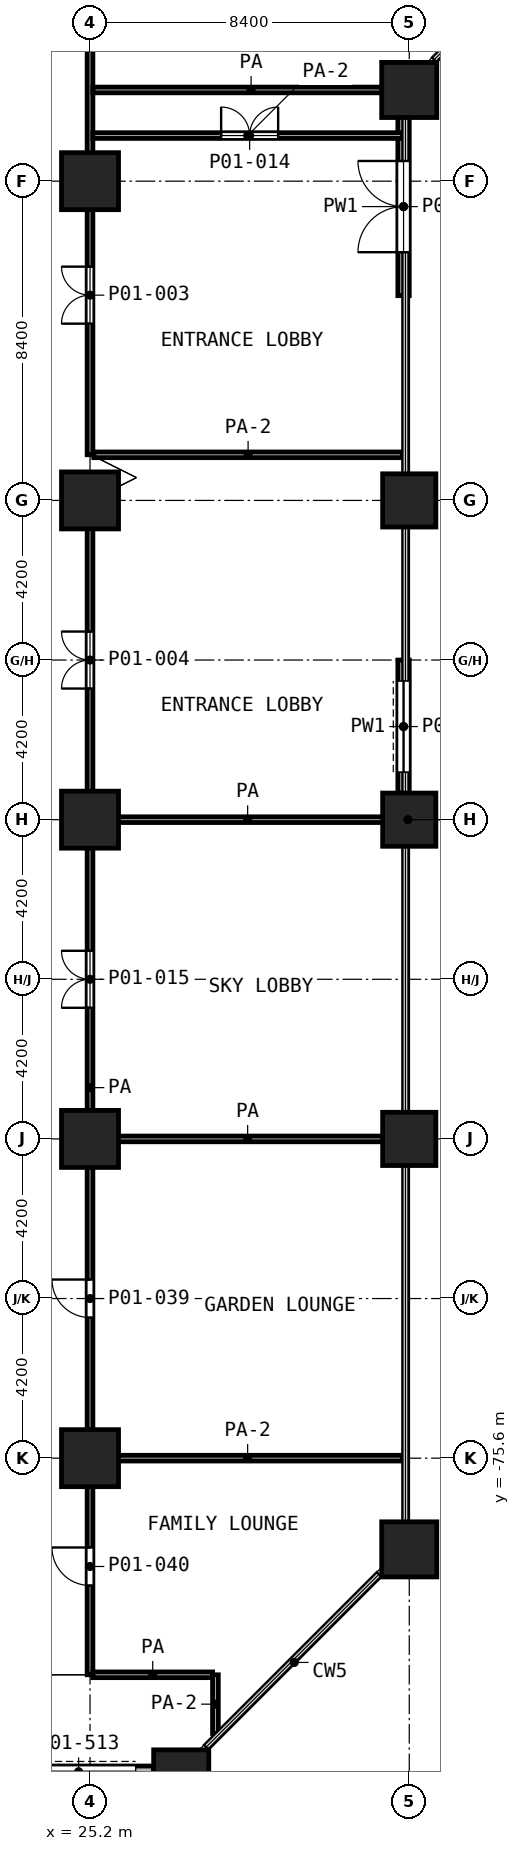
"""IFC4 building model, lengths in metres.
Left out: names, types, materials, properties, quantities, classifications, styles, units other than length and angle.
Written with IfcOpenShell. Run it as: python <this file> out.ifc"""

import sys

from ifc_helpers import new_model, si_unit, direction, frame, frame_2d, origin, origin_2d, place, context, subcontext, project, spatial, rectangle, extrude, element, fill, save


model = new_model("IFC4")
c1 = context("Model", 3, precision=1e-05, world=origin(), true_north=direction((0.0, 1.0)))
c2 = subcontext(c1, "Body", "Model", "MODEL_VIEW")
j1 = project(units=[si_unit("LENGTHUNIT", "METRE"), si_unit("PLANEANGLEUNIT", "RADIAN")], contexts=[c1])
p1 = place(None, origin())
s1 = spatial("IfcSite", under=j1, at=p1, CompositionType="ELEMENT")
p2 = place(p1, origin())
s2 = spatial("IfcBuilding", under=s1, at=p2, CompositionType="ELEMENT")
p3 = place(p2, origin())
s3 = spatial("IfcBuildingStorey", under=s2, at=p3, CompositionType="ELEMENT", Elevation=0.0)
p4 = place(p3, frame((33.6, -39.6, 0.0), z_axis=(0.0, 0.0, 1.0), x_axis=(1.0, 0.0, 0.0)))
e1 = element("IfcColumn", 1, at=p4, inside=s3, PredefinedType="COLUMN", context=c2, shape_type="SweptSolid", body=[
    extrude(rectangle(XDim=1.45, YDim=1.45, at=origin_2d()), origin(), (0.0, 0.0, 1.0), 7.0),
])
for number, where, z_axis, x_axis in (
    (2, (25.2, -42.0, 0.0), (0.0, 0.0, 1.0), (1.0, 0.0, 0.0)),
    (3, (25.2, -50.4, 0.0), (0.0, 0.0, 1.0), (1.0, 0.0, 0.0)),
):
    element("IfcColumn", number, at=place(p3, frame(where, z_axis=z_axis, x_axis=x_axis)), inside=s3, PredefinedType="COLUMN", context=c2, shape_type="SweptSolid", body=[
        extrude(rectangle(XDim=1.5, YDim=1.5, at=origin_2d()), origin(), (0.0, 0.0, 1.0), 7.0),
    ])
p5 = place(p3, frame((33.6, -50.4, 0.0), z_axis=(0.0, 0.0, 1.0), x_axis=(1.0, 0.0, 0.0)))
e4 = element("IfcColumn", 4, at=p5, inside=s3, PredefinedType="COLUMN", context=c2, shape_type="SweptSolid", body=[
    extrude(rectangle(XDim=1.4, YDim=1.4, at=origin_2d()), origin(), (0.0, 0.0, 1.0), 7.0),
])
p6 = place(p3, frame((25.2, -58.8, 0.0), z_axis=(0.0, 0.0, 1.0), x_axis=(1.0, 0.0, 0.0)))
e5 = element("IfcColumn", 5, at=p6, inside=s3, PredefinedType="COLUMN", context=c2, shape_type="SweptSolid", body=[
    extrude(rectangle(XDim=1.5, YDim=1.5, at=origin_2d()), origin(), (0.0, 0.0, 1.0), 7.0),
])
p7 = place(p3, frame((33.6, -58.8, 0.0), z_axis=(0.0, 0.0, 1.0), x_axis=(1.0, 0.0, 0.0)))
e6 = element("IfcColumn", 6, at=p7, inside=s3, PredefinedType="COLUMN", context=c2, shape_type="SweptSolid", body=[
    extrude(rectangle(XDim=1.4, YDim=1.4, at=origin_2d()), origin(), (0.0, 0.0, 1.0), 7.0),
])
p8 = place(p3, frame((25.2, -67.2, 0.0), z_axis=(0.0, 0.0, 1.0), x_axis=(1.0, 0.0, 0.0)))
e7 = element("IfcColumn", 7, at=p8, inside=s3, PredefinedType="COLUMN", context=c2, shape_type="SweptSolid", body=[
    extrude(rectangle(XDim=1.5, YDim=1.5, at=origin_2d()), origin(), (0.0, 0.0, 1.0), 7.0),
])
p9 = place(p3, frame((33.6, -67.2, 0.0), z_axis=(0.0, 0.0, 1.0), x_axis=(1.0, 0.0, 0.0)))
e8 = element("IfcColumn", 8, at=p9, inside=s3, PredefinedType="COLUMN", context=c2, shape_type="SweptSolid", body=[
    extrude(rectangle(XDim=1.4, YDim=1.4, at=origin_2d()), origin(), (0.0, 0.0, 1.0), 7.0),
])
p10 = place(p3, frame((25.2, -75.6, 0.0), z_axis=(0.0, 0.0, 1.0), x_axis=(1.0, 0.0, 0.0)))
e9 = element("IfcColumn", 9, at=p10, inside=s3, PredefinedType="COLUMN", context=c2, shape_type="SweptSolid", body=[
    extrude(rectangle(XDim=1.5, YDim=1.5, at=origin_2d()), origin(), (0.0, 0.0, 1.0), 7.0),
])
for number, where, z_axis, x_axis in (
    (10, (33.6, -78.0, 0.0), (0.0, 0.0, 1.0), (1.0, 0.0, 0.0)),
    (11, (27.6, -84.0, 0.0), (0.0, 0.0, 1.0), (1.0, 0.0, 0.0)),
):
    element("IfcColumn", number, at=place(p3, frame(where, z_axis=z_axis, x_axis=x_axis)), inside=s3, PredefinedType="COLUMN", context=c2, shape_type="SweptSolid", body=[
        extrude(rectangle(XDim=1.45, YDim=1.45, at=origin_2d()), origin(), (0.0, 0.0, 1.0), 7.0),
    ])
p11 = place(p3, frame((33.45, -58.1, 0.0), z_axis=(0.0, 0.0, 1.0), x_axis=(0.0, 1.0, 0.0)))
e12 = element("IfcWall", 12, at=p11, inside=s3, PredefinedType="SOLIDWALL", context=c2, shape_type="SweptSolid", body=[
    extrude(rectangle(XDim=3.5, YDim=0.3, at=frame_2d((1.75, 0.0))), origin(), (0.0, 0.0, 1.0), 5.25),
])
p12 = place(p11, frame((0.55, 0.0, 0.0)))
e13 = element("IfcOpeningElement", 13, at=p12, cuts=e12, PredefinedType="OPENING", context=c2, shape_type="SweptSolid", body=[
    extrude(rectangle(XDim=2.4, YDim=2.4, at=frame_2d((1.2, 1.2))), frame((0.0, 0.16, 0.0), z_axis=(0.0, -1.0, 0.0), x_axis=(1.0, 0.0, 0.0)), (0.0, 0.0, 1.0), 0.32),
])
p13 = place(p3, frame((33.45, -45.012, 0.0), z_axis=(0.0, 0.0, 1.0), x_axis=(0.0, 1.0, 0.0)))
e14 = element("IfcWall", 14, at=p13, inside=s3, PredefinedType="SOLIDWALL", context=c2, shape_type="SweptSolid", body=[
    extrude(rectangle(XDim=4.688, YDim=0.3, at=frame_2d((2.344, 0.0))), origin(), (0.0, 0.0, 1.0), 5.25),
])
p14 = place(p13, frame((1.144, 0.0, 0.0)))
e15 = element("IfcOpeningElement", 15, at=p14, cuts=e14, PredefinedType="OPENING", context=c2, shape_type="SweptSolid", body=[
    extrude(rectangle(XDim=2.4, YDim=2.4, at=frame_2d((1.2, 1.2))), frame((0.0, 0.16, 0.0), z_axis=(0.0, -1.0, 0.0), x_axis=(1.0, 0.0, 0.0)), (0.0, 0.0, 1.0), 0.32),
])
p15 = place(p3, frame((17.5, -83.85, 0.0), z_axis=(0.0, 0.0, 1.0), x_axis=(1.0, 0.0, 0.0)))
e16 = element("IfcWall", 16, at=p15, inside=s3, PredefinedType="SOLIDWALL", context=c2, shape_type="SweptSolid", body=[
    extrude(rectangle(XDim=9.375, YDim=0.3, at=frame_2d((4.688, 0.0))), origin(), (0.0, 0.0, 1.0), 5.25),
])
p16 = place(p15, frame((0.5, 0.0, 0.0)))
e17 = element("IfcOpeningElement", 17, at=p16, cuts=e16, PredefinedType="OPENING", context=c2, shape_type="SweptSolid", body=[
    extrude(rectangle(XDim=3.0, YDim=3.5, at=frame_2d((1.5, 1.75))), frame((0.0, 0.16, 0.0), z_axis=(0.0, -1.0, 0.0), x_axis=(1.0, 0.0, 0.0)), (0.0, 0.0, 1.0), 0.32),
])
p17 = place(p15, frame((5.9, 0.0, 0.0)))
e18 = element("IfcOpeningElement", 18, at=p17, cuts=e16, PredefinedType="OPENING", context=c2, shape_type="SweptSolid", body=[
    extrude(rectangle(XDim=3.0, YDim=3.5, at=frame_2d((1.5, 1.75))), frame((0.0, 0.16, 0.0), z_axis=(0.0, -1.0, 0.0), x_axis=(1.0, 0.0, 0.0)), (0.0, 0.0, 1.0), 0.32),
])
p18 = place(p3, frame((25.275, -81.3, 0.0), z_axis=(0.0, 0.0, 1.0), x_axis=(1.0, 0.0, 0.0)))
e19 = element("IfcWall", 19, at=p18, inside=s3, PredefinedType="PARTITIONING", context=c2, shape_type="SweptSolid", body=[
    extrude(rectangle(XDim=3.15, YDim=0.15, at=frame_2d((1.575, 0.0))), origin(), (0.0, 0.0, 1.0), 6.65),
])
p19 = place(p3, frame((25.275, -75.6, 0.0), z_axis=(0.0, 0.0, 1.0), x_axis=(1.0, 0.0, 0.0)))
e20 = element("IfcWall", 20, at=p19, inside=s3, PredefinedType="PARTITIONING", context=c2, shape_type="SweptSolid", body=[
    extrude(rectangle(XDim=8.145, YDim=0.15, at=frame_2d((4.073, 0.0))), origin(), (0.0, 0.0, 1.0), 5.25),
])
for number, where, z_axis, x_axis in (
    (21, (25.275, -67.2, 0.0), (0.0, 0.0, 1.0), (1.0, 0.0, 0.0)),
    (22, (25.275, -58.8, 0.0), (0.0, 0.0, 1.0), (1.0, 0.0, 0.0)),
):
    element("IfcWall", number, at=place(p3, frame(where, z_axis=z_axis, x_axis=x_axis)), inside=s3, PredefinedType="PARTITIONING", context=c2, shape_type="SweptSolid", body=[
        extrude(rectangle(XDim=8.145, YDim=0.15, at=frame_2d((4.073, 0.0))), origin(), (0.0, 0.0, 1.0), 6.65),
    ])
p20 = place(p3, frame((25.299, -49.2, 0.0), z_axis=(0.0, 0.0, 1.0), x_axis=(1.0, 0.0, 0.0)))
e23 = element("IfcWall", 23, at=p20, inside=s3, PredefinedType="PARTITIONING", context=c2, shape_type="SweptSolid", body=[
    extrude(rectangle(XDim=8.121, YDim=0.15, at=frame_2d((4.061, 0.0))), origin(), (0.0, 0.0, 1.0), 5.25),
])
p21 = place(p3, frame((25.275, -40.8, 0.0), z_axis=(0.0, 0.0, 1.0), x_axis=(1.0, 0.0, 0.0)))
e24 = element("IfcWall", 24, at=p21, inside=s3, PredefinedType="PARTITIONING", context=c2, shape_type="SweptSolid", body=[
    extrude(rectangle(XDim=8.145, YDim=0.15, at=frame_2d((4.073, 0.0))), origin(), (0.0, 0.0, 1.0), 5.25),
])
p22 = place(p21, frame((3.375, 0.0, 0.0)))
e25 = element("IfcOpeningElement", 25, at=p22, cuts=e24, PredefinedType="OPENING", context=c2, shape_type="SweptSolid", body=[
    extrude(rectangle(XDim=1.5, YDim=2.1, at=frame_2d((0.75, 1.05))), frame((0.0, 0.085, 0.0), z_axis=(0.0, -1.0, 0.0), x_axis=(1.0, 0.0, 0.0)), (0.0, 0.0, 1.0), 0.17),
])
p23 = place(p3, frame((25.275, -39.6, 0.0), z_axis=(0.0, 0.0, 1.0), x_axis=(1.0, 0.0, 0.0)))
e26 = element("IfcWall", 26, at=p23, inside=s3, PredefinedType="PARTITIONING", context=c2, shape_type="SweptSolid", body=[
    extrude(rectangle(XDim=8.325, YDim=0.15, at=frame_2d((4.163, 0.0))), origin(), (0.0, 0.0, 1.0), 6.65),
])
p24 = place(p3, frame((25.2, -81.3, 0.0), z_axis=(0.0, 0.0, 1.0), x_axis=(0.0, 1.0, 0.0)))
e27 = element("IfcWall", 27, at=p24, inside=s3, PredefinedType="PARTITIONING", context=c2, shape_type="SweptSolid", body=[
    extrude(rectangle(XDim=30.899, YDim=0.15, at=frame_2d((15.45, 0.0))), origin(), (0.0, 0.0, 1.0), 6.65),
])
p25 = place(p24, frame((25.95, 0.0, 0.0)))
e28 = element("IfcOpeningElement", 28, at=p25, cuts=e27, PredefinedType="OPENING", context=c2, shape_type="SweptSolid", body=[
    extrude(rectangle(XDim=1.5, YDim=2.1, at=frame_2d((0.75, 1.05))), frame((0.0, 0.085, 0.0), z_axis=(0.0, -1.0, 0.0), x_axis=(1.0, 0.0, 0.0)), (0.0, 0.0, 1.0), 0.17),
])
p26 = place(p24, frame((17.55, 0.0, 0.0)))
e29 = element("IfcOpeningElement", 29, at=p26, cuts=e27, PredefinedType="OPENING", context=c2, shape_type="SweptSolid", body=[
    extrude(rectangle(XDim=1.5, YDim=2.1, at=frame_2d((0.75, 1.05))), frame((0.0, 0.085, 0.0), z_axis=(0.0, -1.0, 0.0), x_axis=(1.0, 0.0, 0.0)), (0.0, 0.0, 1.0), 0.17),
])
p27 = place(p24, frame((9.4, 0.0, 0.0)))
e30 = element("IfcOpeningElement", 30, at=p27, cuts=e27, PredefinedType="OPENING", context=c2, shape_type="SweptSolid", body=[
    extrude(rectangle(XDim=1.0, YDim=2.1, at=frame_2d((0.5, 1.05))), frame((0.0, 0.085, 0.0), z_axis=(0.0, -1.0, 0.0), x_axis=(1.0, 0.0, 0.0)), (0.0, 0.0, 1.0), 0.17),
])
p28 = place(p24, frame((2.35, 0.0, 0.0)))
e31 = element("IfcOpeningElement", 31, at=p28, cuts=e27, PredefinedType="OPENING", context=c2, shape_type="SweptSolid", body=[
    extrude(rectangle(XDim=1.0, YDim=2.1, at=frame_2d((0.5, 1.05))), frame((0.0, 0.085, 0.0), z_axis=(0.0, -1.0, 0.0), x_axis=(1.0, 0.0, 0.0)), (0.0, 0.0, 1.0), 0.17),
])
p29 = place(p3, frame((25.2, -49.199, 0.0), z_axis=(0.0, 0.0, 1.0), x_axis=(0.0, 1.0, 0.0)))
e32 = element("IfcWall", 32, at=p29, inside=s3, PredefinedType="PARTITIONING", context=c2, shape_type="SweptSolid", body=[
    extrude(rectangle(XDim=23.999, YDim=0.15, at=frame_2d((12.0, 0.0))), origin(), (0.0, 0.0, 1.0), 6.65),
])
p30 = place(p29, frame((3.45, 0.0, 0.0)))
e33 = element("IfcOpeningElement", 33, at=p30, cuts=e32, PredefinedType="OPENING", context=c2, shape_type="SweptSolid", body=[
    extrude(rectangle(XDim=1.5, YDim=2.1, at=frame_2d((0.75, 1.05))), frame((0.0, 0.085, 0.0), z_axis=(0.0, -1.0, 0.0), x_axis=(1.0, 0.0, 0.0)), (0.0, 0.0, 1.0), 0.17),
])
p31 = place(p3, frame((28.5, -82.845, 0.0), z_axis=(0.0, 0.0, 1.0), x_axis=(0.0, 1.0, 0.0)))
e34 = element("IfcWall", 34, at=p31, inside=s3, PredefinedType="PARTITIONING", context=c2, shape_type="SweptSolid", body=[
    extrude(rectangle(XDim=1.545, YDim=0.15, at=frame_2d((0.772, 0.0))), origin(), (0.0, 0.0, 1.0), 5.25),
])
p32 = place(p12, origin())
e35 = element("IfcDoor", 35, at=p32, inside=s3, OperationType="DOUBLE_DOOR_SLIDING", PredefinedType="DOOR", context=c2, shape_type="SweptSolid", body=[
    extrude(rectangle(XDim=2.4, YDim=2.4, at=frame_2d((1.2, 1.2))), frame((0.0, 0.025, 0.0), z_axis=(0.0, -1.0, 0.0), x_axis=(1.0, 0.0, 0.0)), (0.0, 0.0, 1.0), 0.05),
])
fill(e13, e35)
p33 = place(p14, origin())
e36 = element("IfcDoor", 36, at=p33, inside=s3, OperationType="DOUBLE_DOOR_DOUBLE_SWING", PredefinedType="DOOR", context=c2, shape_type="SweptSolid", body=[
    extrude(rectangle(XDim=2.4, YDim=2.4, at=frame_2d((1.2, 1.2))), frame((0.0, 0.025, 0.0), z_axis=(0.0, -1.0, 0.0), x_axis=(1.0, 0.0, 0.0)), (0.0, 0.0, 1.0), 0.05),
])
fill(e15, e36)
p34 = place(p17, origin())
e37 = element("IfcDoor", 37, at=p34, inside=s3, OperationType="ROLLINGUP", PredefinedType="DOOR", context=c2, shape_type="SweptSolid", body=[
    extrude(rectangle(XDim=3.0, YDim=3.5, at=frame_2d((1.5, 1.75))), frame((0.0, 0.025, 0.0), z_axis=(0.0, -1.0, 0.0), x_axis=(1.0, 0.0, 0.0)), (0.0, 0.0, 1.0), 0.05),
])
fill(e18, e37)
p35 = place(p30, origin())
e38 = element("IfcDoor", 38, at=p35, inside=s3, OperationType="DOUBLE_DOOR_SINGLE_SWING", PredefinedType="DOOR", context=c2, shape_type="SweptSolid", body=[
    extrude(rectangle(XDim=1.5, YDim=2.1, at=frame_2d((0.75, 1.05))), frame((0.0, 0.025, 0.0), z_axis=(0.0, -1.0, 0.0), x_axis=(1.0, 0.0, 0.0)), (0.0, 0.0, 1.0), 0.05),
])
fill(e33, e38)
p36 = place(p25, origin())
e39 = element("IfcDoor", 39, at=p36, inside=s3, OperationType="DOUBLE_DOOR_SINGLE_SWING", PredefinedType="DOOR", context=c2, shape_type="SweptSolid", body=[
    extrude(rectangle(XDim=1.5, YDim=2.1, at=frame_2d((0.75, 1.05))), frame((0.0, 0.025, 0.0), z_axis=(0.0, -1.0, 0.0), x_axis=(1.0, 0.0, 0.0)), (0.0, 0.0, 1.0), 0.05),
])
fill(e28, e39)
p37 = place(p22, origin())
e40 = element("IfcDoor", 40, at=p37, inside=s3, OperationType="DOUBLE_DOOR_SINGLE_SWING", PredefinedType="DOOR", context=c2, shape_type="SweptSolid", body=[
    extrude(rectangle(XDim=1.5, YDim=2.1, at=frame_2d((0.75, 1.05))), frame((0.0, 0.025, 0.0), z_axis=(0.0, -1.0, 0.0), x_axis=(1.0, 0.0, 0.0)), (0.0, 0.0, 1.0), 0.05),
])
fill(e25, e40)
p38 = place(p26, origin())
e41 = element("IfcDoor", 41, at=p38, inside=s3, OperationType="DOUBLE_DOOR_SINGLE_SWING", PredefinedType="DOOR", context=c2, shape_type="SweptSolid", body=[
    extrude(rectangle(XDim=1.5, YDim=2.1, at=frame_2d((0.75, 1.05))), frame((0.0, 0.025, 0.0), z_axis=(0.0, -1.0, 0.0), x_axis=(1.0, 0.0, 0.0)), (0.0, 0.0, 1.0), 0.05),
])
fill(e29, e41)
p39 = place(p27, origin())
e42 = element("IfcDoor", 42, at=p39, inside=s3, OperationType="SINGLE_SWING_RIGHT", PredefinedType="DOOR", context=c2, shape_type="SweptSolid", body=[
    extrude(rectangle(XDim=1.0, YDim=2.1, at=frame_2d((0.5, 1.05))), frame((0.0, 0.025, 0.0), z_axis=(0.0, -1.0, 0.0), x_axis=(1.0, 0.0, 0.0)), (0.0, 0.0, 1.0), 0.05),
])
fill(e30, e42)
p40 = place(p28, origin())
e43 = element("IfcDoor", 43, at=p40, inside=s3, OperationType="SINGLE_SWING_RIGHT", PredefinedType="DOOR", context=c2, shape_type="SweptSolid", body=[
    extrude(rectangle(XDim=1.0, YDim=2.1, at=frame_2d((0.5, 1.05))), frame((0.0, 0.025, 0.0), z_axis=(0.0, -1.0, 0.0), x_axis=(1.0, 0.0, 0.0)), (0.0, 0.0, 1.0), 0.05),
])
fill(e31, e43)
save(model, sys.argv[1])
